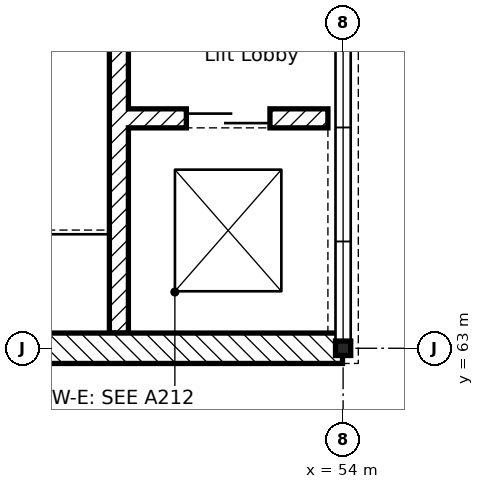
"""IFC4 building model, lengths in metres.
Left out: names, types, materials, properties, quantities, classifications, styles, units other than length and angle.
Written with IfcOpenShell. Run it as: python <this file> out.ifc"""

import sys

from ifc_helpers import new_model, si_unit, direction, frame, frame_2d, origin, origin_2d, place, context, subcontext, project, spatial, rectangle, i_section, extrude, element, fill, save


model = new_model("IFC4")
c1 = context("Model", 3, precision=1e-05, world=origin(), true_north=direction((0.0, 1.0)))
c2 = subcontext(c1, "Body", "Model", "MODEL_VIEW")
j1 = project(units=[si_unit("LENGTHUNIT", "METRE"), si_unit("PLANEANGLEUNIT", "RADIAN")], contexts=[c1])
p1 = place(None, origin())
s1 = spatial("IfcSite", under=j1, at=p1, CompositionType="ELEMENT")
p2 = place(p1, origin())
s2 = spatial("IfcBuilding", under=s1, at=p2, CompositionType="ELEMENT")
p3 = place(p2, frame((0.0, 0.0, 18.6)))
s3 = spatial("IfcBuildingStorey", under=s2, at=p3, CompositionType="ELEMENT", Elevation=18.6)
p4 = place(p3, frame((54.0, 63.0, -0.2), z_axis=(0.0, 0.0, 1.0), x_axis=(1.0, 0.0, 0.0)))
e1 = element("IfcColumn", 1, at=p4, inside=s3, PredefinedType="COLUMN", context=c2, shape_type="SweptSolid", body=[
    extrude(i_section(OverallWidth=0.2, OverallDepth=0.19, WebThickness=0.007, FlangeThickness=0.01, FilletRadius=0.018, at=origin_2d()), origin(), (0.0, 0.0, 1.0), 4.15),
])
p5 = place(p3, frame((51.05, 63.2, 0.0), z_axis=(0.0, 0.0, 1.0), x_axis=(0.0, 1.0, 0.0)))
e2 = element("IfcWall", 2, at=p5, inside=s3, PredefinedType="SHEAR", context=c2, shape_type="SweptSolid", body=[
    extrude(rectangle(XDim=7.225, YDim=0.25, at=frame_2d((3.613, 0.0))), origin(), (0.0, 0.0, 1.0), 3.95),
])
p6 = place(p3, frame((51.175, 66.025, 0.0), z_axis=(0.0, 0.0, 1.0), x_axis=(1.0, 0.0, 0.0)))
e3 = element("IfcWall", 3, at=p6, inside=s3, PredefinedType="SHEAR", context=c2, shape_type="SweptSolid", body=[
    extrude(rectangle(XDim=2.625, YDim=0.25, at=frame_2d((1.312, 0.0))), origin(), (0.0, 0.0, 1.0), 3.95),
])
p7 = place(p6, frame((0.762, 0.0, 0.0)))
e4 = element("IfcOpeningElement", 4, at=p7, cuts=e3, PredefinedType="OPENING", context=c2, shape_type="SweptSolid", body=[
    extrude(rectangle(XDim=1.1, YDim=2.1, at=frame_2d((0.55, 1.05))), frame((0.0, 0.135, 0.0), z_axis=(0.0, -1.0, 0.0), x_axis=(1.0, 0.0, 0.0)), (0.0, 0.0, 1.0), 0.27),
])
p8 = place(p3, frame((53.992, 63.0, 0.0), z_axis=(0.0, 0.0, 1.0), x_axis=(-1.0, 0.0, 0.0)))
e5 = element("IfcWall", 5, at=p8, inside=s3, PredefinedType="STANDARD", context=c2, shape_type="SweptSolid", body=[
    extrude(rectangle(XDim=8.983, YDim=0.4, at=frame_2d((4.492, 0.0))), origin(), (0.0, 0.0, 1.0), 3.55),
])
p9 = place(p8, frame((7.117, 0.0, 1.5)))
e6 = element("IfcOpeningElement", 6, at=p9, cuts=e5, PredefinedType="OPENING", context=c2, shape_type="SweptSolid", body=[
    extrude(rectangle(XDim=0.75, YDim=1.2, at=frame_2d((0.375, 0.6))), frame((0.0, 0.21, 0.0), z_axis=(0.0, -1.0, 0.0), x_axis=(1.0, 0.0, 0.0)), (0.0, 0.0, 1.0), 0.42),
])
p10 = place(p8, frame((3.892, 0.0, 0.9)))
e7 = element("IfcOpeningElement", 7, at=p10, cuts=e5, PredefinedType="OPENING", context=c2, shape_type="SweptSolid", body=[
    extrude(rectangle(XDim=1.2, YDim=2.4, at=frame_2d((0.6, 1.2))), frame((0.0, 0.21, 0.0), z_axis=(0.0, -1.0, 0.0), x_axis=(1.0, 0.0, 0.0)), (0.0, 0.0, 1.0), 0.42),
])
p11 = place(p7, origin())
e8 = element("IfcDoor", 8, at=p11, inside=s3, OperationType="SLIDING_TO_LEFT", PredefinedType="DOOR", context=c2, shape_type="SweptSolid", body=[
    extrude(rectangle(XDim=1.1, YDim=2.1, at=frame_2d((0.55, 1.05))), frame((0.0, 0.025, 0.0), z_axis=(0.0, -1.0, 0.0), x_axis=(1.0, 0.0, 0.0)), (0.0, 0.0, 1.0), 0.05),
])
fill(e4, e8)
save(model, sys.argv[1])
